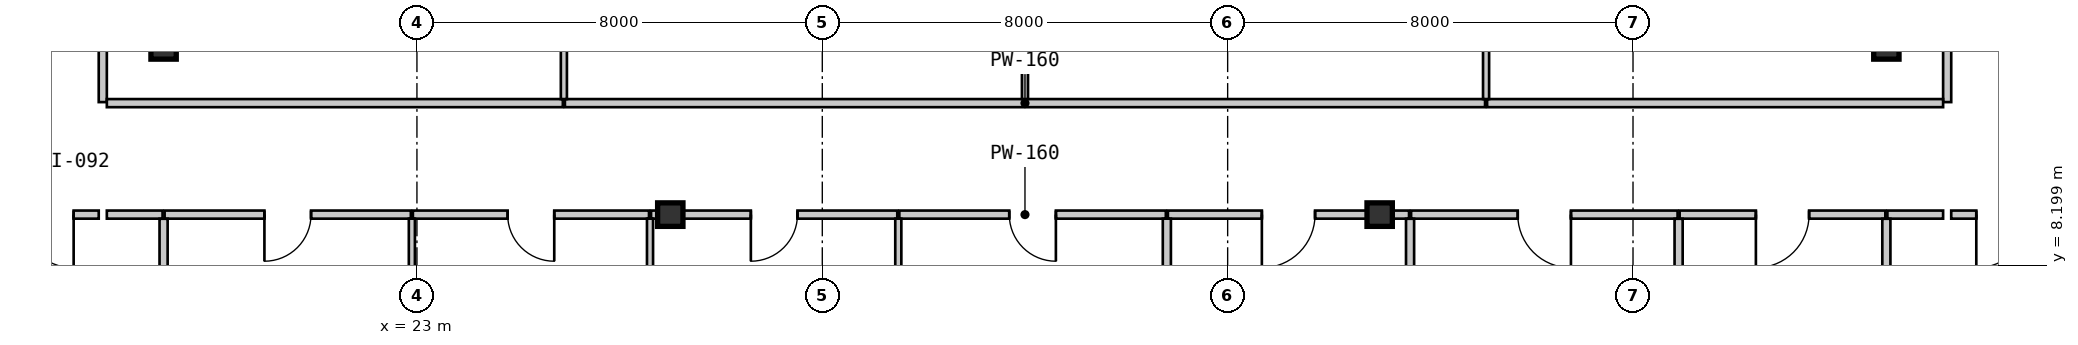
"""IFC4 building model, lengths in metres.
Left out: names, types, materials, properties, quantities, classifications, styles, units other than length and angle.
Written with IfcOpenShell. Run it as: python <this file> out.ifc"""

import sys

from ifc_helpers import new_model, si_unit, direction, frame, frame_2d, origin, origin_2d, place, context, subcontext, project, spatial, rectangle, i_section, extrude, source, transform, mapped, element, fill, save


model = new_model("IFC4")
c1 = context("Model", 3, precision=1e-05, world=origin(), true_north=direction((0.0, 1.0)))
c2 = subcontext(c1, "Body", "Model", "MODEL_VIEW")
j1 = project(units=[si_unit("LENGTHUNIT", "METRE"), si_unit("PLANEANGLEUNIT", "RADIAN")], contexts=[c1])
p1 = place(None, origin())
s1 = spatial("IfcSite", under=j1, at=p1, CompositionType="ELEMENT")
p2 = place(p1, origin())
s2 = spatial("IfcBuilding", under=s1, at=p2, CompositionType="ELEMENT")
p3 = place(p2, frame((0.0, 0.0, 68.25)))
s3 = spatial("IfcBuildingStorey", under=s2, at=p3, CompositionType="ELEMENT", Elevation=68.25)
m1 = source(origin(), c2, "Body", "SweptSolid", [
    extrude(i_section(OverallWidth=0.5, OverallDepth=0.464, WebThickness=0.022, FlangeThickness=0.034, at=origin_2d()), origin(), (0.0, 0.0, 1.0), 3.15),
])
for number, where, z_axis, x_axis in (
    (1, (28.0, 9.2, 0.0), (0.0, 0.0, 1.0), (1.0, 0.0, 0.0)),
    (2, (42.0, 9.2, 0.0), (0.0, 0.0, 1.0), (1.0, 0.0, 0.0)),
    (3, (18.0, 12.5, 0.0), (0.0, 0.0, 1.0), (1.0, 0.0, 0.0)),
    (4, (52.0, 12.5, 0.0), (0.0, 0.0, 1.0), (1.0, 0.0, 0.0)),
):
    element("IfcColumn", number, at=place(p3, frame(where, z_axis=z_axis, x_axis=x_axis)), inside=s3, PredefinedType="COLUMN", context=c2, shape_type="MappedRepresentation", body=[
        mapped(m1, transform((0.0, 0.0, 0.0), scale=1.0)),
    ])
m2 = source(origin(), c2, "Body", "SweptSolid", [
    extrude(rectangle(XDim=10.3, YDim=0.16, at=frame_2d((5.15, 0.0))), origin(), (0.0, 0.0, 1.0), 2.93),
])
p4 = place(p3, frame((16.8, 21.72, 0.0), z_axis=(0.0, 0.0, 1.0), x_axis=(0.0, -1.0, 0.0)))
e5 = element("IfcWall", 5, at=p4, inside=s3, PredefinedType="PARTITIONING", context=c2, shape_type="MappedRepresentation", body=[
    mapped(m2, transform((0.0, 0.0, 0.0), scale=1.0)),
])
m3 = source(origin(), c2, "Body", "SweptSolid", [
    extrude(rectangle(XDim=1.05, YDim=2.1, at=frame_2d((0.525, 1.05))), frame((0.0, 0.09, 0.0), z_axis=(0.0, -1.0, 0.0), x_axis=(1.0, 0.0, 0.0)), (0.0, 0.0, 1.0), 0.18),
])
p5 = place(p4, frame((4.595, 0.0, 0.0)))
e6 = element("IfcOpeningElement", 6, at=p5, cuts=e5, PredefinedType="OPENING", context=c2, shape_type="MappedRepresentation", body=[
    mapped(m3, transform((0.0, 0.0, 0.0), scale=1.0)),
])
p6 = place(p3, frame((53.2, 11.42, 0.0), z_axis=(0.0, 0.0, 1.0), x_axis=(0.0, 1.0, 0.0)))
e7 = element("IfcWall", 7, at=p6, inside=s3, PredefinedType="PARTITIONING", context=c2, shape_type="MappedRepresentation", body=[
    mapped(m2, transform((0.0, 0.0, 0.0), scale=1.0)),
])
p7 = place(p6, frame((4.655, 0.0, 0.0)))
e8 = element("IfcOpeningElement", 8, at=p7, cuts=e7, PredefinedType="OPENING", context=c2, shape_type="MappedRepresentation", body=[
    mapped(m3, transform((0.0, 0.0, 0.0), scale=1.0)),
])
m4 = source(origin(), c2, "Body", "SweptSolid", [
    extrude(rectangle(XDim=2.04, YDim=0.16, at=frame_2d((1.02, 0.0))), origin(), (0.0, 0.0, 1.0), 2.93),
])
p8 = place(p3, frame((16.72, 9.2, 0.0), z_axis=(0.0, 0.0, 1.0), x_axis=(-1.0, 0.0, 0.0)))
e9 = element("IfcWall", 9, at=p8, inside=s3, PredefinedType="PARTITIONING", context=c2, shape_type="MappedRepresentation", body=[
    mapped(m4, transform((0.0, 0.0, 0.0), scale=1.0)),
])
p9 = place(p8, frame((0.495, 0.0, 0.0)))
e10 = element("IfcOpeningElement", 10, at=p9, cuts=e9, PredefinedType="OPENING", context=c2, shape_type="MappedRepresentation", body=[
    mapped(m3, transform((0.0, 0.0, 0.0), scale=1.0)),
])
p10 = place(p3, frame((55.32, 9.2, 0.0), z_axis=(0.0, 0.0, 1.0), x_axis=(-1.0, 0.0, 0.0)))
e11 = element("IfcWall", 11, at=p10, inside=s3, PredefinedType="PARTITIONING", context=c2, shape_type="MappedRepresentation", body=[
    mapped(m4, transform((0.0, 0.0, 0.0), scale=1.0)),
])
p11 = place(p10, frame((0.495, 0.0, 0.0)))
e12 = element("IfcOpeningElement", 12, at=p11, cuts=e11, PredefinedType="OPENING", context=c2, shape_type="MappedRepresentation", body=[
    mapped(m3, transform((0.0, 0.0, 0.0), scale=1.0)),
])
m5 = source(origin(), c2, "Body", "SweptSolid", [
    extrude(rectangle(XDim=9.0, YDim=0.16, at=frame_2d((4.5, 0.0))), origin(), (0.0, 0.0, 1.0), 2.93),
])
p12 = place(p3, frame((16.88, 11.4, 0.0), z_axis=(0.0, 0.0, 1.0), x_axis=(1.0, 0.0, 0.0)))
e13 = element("IfcWall", 13, at=p12, inside=s3, PredefinedType="PARTITIONING", context=c2, shape_type="MappedRepresentation", body=[
    mapped(m5, transform((0.0, 0.0, 0.0), scale=1.0)),
])
m6 = source(origin(), c2, "Body", "SweptSolid", [
    extrude(rectangle(XDim=9.06, YDim=0.16, at=frame_2d((4.53, 0.0))), origin(), (0.0, 0.0, 1.0), 2.93),
])
for number, where, z_axis, x_axis in (
    (14, (25.92, 11.4, 0.0), (0.0, 0.0, 1.0), (1.0, 0.0, 0.0)),
    (15, (35.02, 11.4, 0.0), (0.0, 0.0, 1.0), (1.0, 0.0, 0.0)),
):
    element("IfcWall", number, at=place(p3, frame(where, z_axis=z_axis, x_axis=x_axis)), inside=s3, PredefinedType="PARTITIONING", context=c2, shape_type="MappedRepresentation", body=[
        mapped(m6, transform((0.0, 0.0, 0.0), scale=1.0)),
    ])
p13 = place(p3, frame((44.12, 11.4, 0.0), z_axis=(0.0, 0.0, 1.0), x_axis=(1.0, 0.0, 0.0)))
e16 = element("IfcWall", 16, at=p13, inside=s3, PredefinedType="PARTITIONING", context=c2, shape_type="MappedRepresentation", body=[
    mapped(m5, transform((0.0, 0.0, 0.0), scale=1.0)),
])
m7 = source(origin(), c2, "Body", "SweptSolid", [
    extrude(rectangle(XDim=1.1, YDim=0.16, at=frame_2d((0.55, 0.0))), origin(), (0.0, 0.0, 1.0), 2.93),
])
p14 = place(p3, frame((17.98, 9.2, 0.0), z_axis=(0.0, 0.0, 1.0), x_axis=(-1.0, 0.0, 0.0)))
e17 = element("IfcWall", 17, at=p14, inside=s3, PredefinedType="PARTITIONING", context=c2, shape_type="MappedRepresentation", body=[
    mapped(m7, transform((0.0, 0.0, 0.0), scale=1.0)),
])
m8 = source(origin(), c2, "Body", "SweptSolid", [
    extrude(rectangle(XDim=4.86, YDim=0.16, at=frame_2d((2.43, 0.0))), origin(), (0.0, 0.0, 1.0), 2.93),
])
p15 = place(p3, frame((22.88, 9.2, 0.0), z_axis=(0.0, 0.0, 1.0), x_axis=(-1.0, 0.0, 0.0)))
e18 = element("IfcWall", 18, at=p15, inside=s3, PredefinedType="PARTITIONING", context=c2, shape_type="MappedRepresentation", body=[
    mapped(m8, transform((0.0, 0.0, 0.0), scale=1.0)),
])
m9 = source(origin(), c2, "Body", "SweptSolid", [
    extrude(rectangle(XDim=0.92, YDim=2.1, at=frame_2d((0.46, 1.05))), frame((0.0, 0.09, 0.0), z_axis=(0.0, -1.0, 0.0), x_axis=(1.0, 0.0, 0.0)), (0.0, 0.0, 1.0), 0.18),
])
p16 = place(p15, frame((1.97, 0.0, 0.0)))
e19 = element("IfcOpeningElement", 19, at=p16, cuts=e18, PredefinedType="OPENING", context=c2, shape_type="MappedRepresentation", body=[
    mapped(m9, transform((0.0, 0.0, 0.0), scale=1.0)),
])
m10 = source(origin(), c2, "Body", "SweptSolid", [
    extrude(rectangle(XDim=4.66, YDim=0.16, at=frame_2d((2.33, 0.0))), origin(), (0.0, 0.0, 1.0), 2.93),
])
p17 = place(p3, frame((27.58, 9.2, 0.0), z_axis=(0.0, 0.0, 1.0), x_axis=(-1.0, 0.0, 0.0)))
e20 = element("IfcWall", 20, at=p17, inside=s3, PredefinedType="PARTITIONING", context=c2, shape_type="MappedRepresentation", body=[
    mapped(m10, transform((0.0, 0.0, 0.0), scale=1.0)),
])
p18 = place(p17, frame((1.87, 0.0, 0.0)))
e21 = element("IfcOpeningElement", 21, at=p18, cuts=e20, PredefinedType="OPENING", context=c2, shape_type="MappedRepresentation", body=[
    mapped(m9, transform((0.0, 0.0, 0.0), scale=1.0)),
])
m11 = source(origin(), c2, "Body", "SweptSolid", [
    extrude(rectangle(XDim=4.48, YDim=0.16, at=frame_2d((2.24, 0.0))), origin(), (0.0, 0.0, 1.0), 2.328),
])
p19 = place(p3, frame((32.48, 9.2, 0.0), z_axis=(0.0, 0.0, 1.0), x_axis=(-1.0, 0.0, 0.0)))
e22 = element("IfcWall", 22, at=p19, inside=s3, PredefinedType="PARTITIONING", context=c2, shape_type="MappedRepresentation", body=[
    mapped(m11, transform((0.0, 0.0, 0.0), scale=1.0)),
])
p20 = place(p19, frame((1.97, 0.0, 0.0)))
e23 = element("IfcOpeningElement", 23, at=p20, cuts=e22, PredefinedType="OPENING", context=c2, shape_type="MappedRepresentation", body=[
    mapped(m9, transform((0.0, 0.0, 0.0), scale=1.0)),
])
m12 = source(origin(), c2, "Body", "SweptSolid", [
    extrude(rectangle(XDim=0.38, YDim=0.16, at=frame_2d((0.19, 0.0))), origin(), (0.0, 0.0, 1.0), 2.93),
])
p21 = place(p3, frame((28.0, 9.2, 0.0), z_axis=(0.0, 0.0, 1.0), x_axis=(-1.0, 0.0, 0.0)))
e24 = element("IfcWall", 24, at=p21, inside=s3, PredefinedType="PARTITIONING", context=c2, shape_type="MappedRepresentation", body=[
    mapped(m12, transform((0.0, 0.0, 0.0), scale=1.0)),
])
m13 = source(origin(), c2, "Body", "SweptSolid", [
    extrude(rectangle(XDim=5.26, YDim=0.16, at=frame_2d((2.63, 0.0))), origin(), (0.0, 0.0, 1.0), 2.328),
])
p22 = place(p3, frame((37.78, 9.2, 0.0), z_axis=(0.0, 0.0, 1.0), x_axis=(-1.0, 0.0, 0.0)))
e25 = element("IfcWall", 25, at=p22, inside=s3, PredefinedType="PARTITIONING", context=c2, shape_type="MappedRepresentation", body=[
    mapped(m13, transform((0.0, 0.0, 0.0), scale=1.0)),
])
p23 = place(p22, frame((2.17, 0.0, 0.0)))
e26 = element("IfcOpeningElement", 26, at=p23, cuts=e25, PredefinedType="OPENING", context=c2, shape_type="MappedRepresentation", body=[
    mapped(m9, transform((0.0, 0.0, 0.0), scale=1.0)),
])
m14 = source(origin(), c2, "Body", "SweptSolid", [
    extrude(rectangle(XDim=0.58, YDim=0.16, at=frame_2d((0.29, 0.0))), origin(), (0.0, 0.0, 1.0), 2.93),
])
p24 = place(p3, frame((42.58, 9.2, 0.0), z_axis=(0.0, 0.0, 1.0), x_axis=(-1.0, 0.0, 0.0)))
e27 = element("IfcWall", 27, at=p24, inside=s3, PredefinedType="PARTITIONING", context=c2, shape_type="MappedRepresentation", body=[
    mapped(m14, transform((0.0, 0.0, 0.0), scale=1.0)),
])
m15 = source(origin(), c2, "Body", "SweptSolid", [
    extrude(rectangle(XDim=4.18, YDim=0.16, at=frame_2d((2.09, 0.0))), origin(), (0.0, 0.0, 1.0), 2.328),
])
p25 = place(p3, frame((42.0, 9.2, 0.0), z_axis=(0.0, 0.0, 1.0), x_axis=(-1.0, 0.0, 0.0)))
e28 = element("IfcWall", 28, at=p25, inside=s3, PredefinedType="PARTITIONING", context=c2, shape_type="MappedRepresentation", body=[
    mapped(m15, transform((0.0, 0.0, 0.0), scale=1.0)),
])
p26 = place(p25, frame((1.275, 0.0, 0.0)))
e29 = element("IfcOpeningElement", 29, at=p26, cuts=e28, PredefinedType="OPENING", context=c2, shape_type="MappedRepresentation", body=[
    mapped(m3, transform((0.0, 0.0, 0.0), scale=1.0)),
])
m16 = source(origin(), c2, "Body", "SweptSolid", [
    extrude(rectangle(XDim=5.259, YDim=0.16, at=frame_2d((2.63, 0.0))), origin(), (0.0, 0.0, 1.0), 2.93),
])
p27 = place(p3, frame((47.88, 9.2, 0.0), z_axis=(0.0, 0.0, 1.0), x_axis=(-1.0, 0.0, 0.0)))
e30 = element("IfcWall", 30, at=p27, inside=s3, PredefinedType="PARTITIONING", context=c2, shape_type="MappedRepresentation", body=[
    mapped(m16, transform((0.0, 0.0, 0.0), scale=1.0)),
])
p28 = place(p27, frame((2.105, 0.0, 0.0)))
e31 = element("IfcOpeningElement", 31, at=p28, cuts=e30, PredefinedType="OPENING", context=c2, shape_type="MappedRepresentation", body=[
    mapped(m3, transform((0.0, 0.0, 0.0), scale=1.0)),
])
m17 = source(origin(), c2, "Body", "SweptSolid", [
    extrude(rectangle(XDim=4.059, YDim=0.16, at=frame_2d((2.03, 0.0))), origin(), (0.0, 0.0, 1.0), 2.93),
])
p29 = place(p3, frame((51.98, 9.2, 0.0), z_axis=(0.0, 0.0, 1.0), x_axis=(-1.0, 0.0, 0.0)))
e32 = element("IfcWall", 32, at=p29, inside=s3, PredefinedType="PARTITIONING", context=c2, shape_type="MappedRepresentation", body=[
    mapped(m17, transform((0.0, 0.0, 0.0), scale=1.0)),
])
p30 = place(p29, frame((1.505, 0.0, 0.0)))
e33 = element("IfcOpeningElement", 33, at=p30, cuts=e32, PredefinedType="OPENING", context=c2, shape_type="MappedRepresentation", body=[
    mapped(m3, transform((0.0, 0.0, 0.0), scale=1.0)),
])
p31 = place(p3, frame((53.12, 9.2, 0.0), z_axis=(0.0, 0.0, 1.0), x_axis=(-1.0, 0.0, 0.0)))
e34 = element("IfcWall", 34, at=p31, inside=s3, PredefinedType="PARTITIONING", context=c2, shape_type="MappedRepresentation", body=[
    mapped(m7, transform((0.0, 0.0, 0.0), scale=1.0)),
])
m18 = source(origin(), c2, "Body", "SweptSolid", [
    extrude(rectangle(XDim=10.24, YDim=0.12, at=frame_2d((5.12, 0.0))), origin(), (0.0, 0.0, 1.0), 2.93),
])
for number, where, z_axis, x_axis in (
    (35, (25.9, 21.72, 0.0), (0.0, 0.0, 1.0), (0.0, -1.0, 0.0)),
    (36, (35.0, 21.72, 0.0), (0.0, 0.0, 1.0), (0.0, -1.0, 0.0)),
    (37, (44.1, 21.72, 0.0), (0.0, 0.0, 1.0), (0.0, -1.0, 0.0)),
):
    element("IfcWall", number, at=place(p3, frame(where, z_axis=z_axis, x_axis=x_axis)), inside=s3, PredefinedType="PARTITIONING", context=c2, shape_type="MappedRepresentation", body=[
        mapped(m18, transform((0.0, 0.0, 0.0), scale=1.0)),
    ])
m19 = source(origin(), c2, "Body", "SweptSolid", [
    extrude(rectangle(XDim=9.325, YDim=0.16, at=frame_2d((4.663, 0.0))), origin(), (0.0, 0.0, 1.0), 2.93),
])
p32 = place(p3, frame((18.0, 9.118, 0.0), z_axis=(0.0, 0.0, 1.0), x_axis=(0.0, -1.0, 0.0)))
e38 = element("IfcWall", 38, at=p32, inside=s3, PredefinedType="PARTITIONING", context=c2, shape_type="MappedRepresentation", body=[
    mapped(m19, transform((0.0, 0.0, 0.0), scale=1.0)),
])
m20 = source(origin(), c2, "Body", "SweptSolid", [
    extrude(rectangle(XDim=8.849, YDim=0.12, at=frame_2d((4.424, 0.0))), origin(), (0.0, 0.0, 1.0), 2.93),
])
p33 = place(p3, frame((22.9, 9.12, 0.0), z_axis=(0.0, 0.0, 1.0), x_axis=(0.0, -1.0, 0.0)))
e39 = element("IfcWall", 39, at=p33, inside=s3, PredefinedType="PARTITIONING", context=c2, shape_type="MappedRepresentation", body=[
    mapped(m20, transform((0.0, 0.0, 0.0), scale=1.0)),
])
m21 = source(origin(), c2, "Body", "SweptSolid", [
    extrude(rectangle(XDim=8.388, YDim=0.12, at=frame_2d((4.194, 0.0))), origin(), (0.0, 0.0, 1.0), 2.93),
])
p34 = place(p3, frame((27.6, 9.12, 0.0), z_axis=(0.0, 0.0, 1.0), x_axis=(0.0, -1.0, 0.0)))
e40 = element("IfcWall", 40, at=p34, inside=s3, PredefinedType="PARTITIONING", context=c2, shape_type="MappedRepresentation", body=[
    mapped(m21, transform((0.0, 0.0, 0.0), scale=1.0)),
])
m22 = source(origin(), c2, "Body", "SweptSolid", [
    extrude(rectangle(XDim=7.907, YDim=0.12, at=frame_2d((3.954, 0.0))), origin(), (0.0, 0.0, 1.0), 2.93),
])
p35 = place(p3, frame((32.5, 9.12, 0.0), z_axis=(0.0, 0.0, 1.0), x_axis=(0.0, -1.0, 0.0)))
e41 = element("IfcWall", 41, at=p35, inside=s3, PredefinedType="PARTITIONING", context=c2, shape_type="MappedRepresentation", body=[
    mapped(m22, transform((0.0, 0.0, 0.0), scale=1.0)),
])
m23 = source(origin(), c2, "Body", "SweptSolid", [
    extrude(rectangle(XDim=2.441, YDim=0.16, at=frame_2d((1.22, 0.0))), origin(), (0.0, 0.0, 1.0), 2.93),
])
p36 = place(p3, frame((37.8, 9.12, 0.0), z_axis=(0.0, 0.0, 1.0), x_axis=(0.0, -1.0, 0.0)))
e42 = element("IfcWall", 42, at=p36, inside=s3, PredefinedType="PARTITIONING", context=c2, shape_type="MappedRepresentation", body=[
    mapped(m23, transform((0.0, 0.0, 0.0), scale=1.0)),
])
m24 = source(origin(), c2, "Body", "SweptSolid", [
    extrude(rectangle(XDim=2.203, YDim=0.16, at=frame_2d((1.102, 0.0))), origin(), (0.0, 0.0, 1.0), 2.93),
])
p37 = place(p3, frame((42.6, 9.118, 0.0), z_axis=(0.0, 0.0, 1.0), x_axis=(0.0, -1.0, 0.0)))
e43 = element("IfcWall", 43, at=p37, inside=s3, PredefinedType="PARTITIONING", context=c2, shape_type="MappedRepresentation", body=[
    mapped(m24, transform((0.0, 0.0, 0.0), scale=1.0)),
])
m25 = source(origin(), c2, "Body", "SweptSolid", [
    extrude(rectangle(XDim=1.939, YDim=0.16, at=frame_2d((0.97, 0.0))), origin(), (0.0, 0.0, 1.0), 2.93),
])
p38 = place(p3, frame((47.9, 9.118, 0.0), z_axis=(0.0, 0.0, 1.0), x_axis=(0.0, -1.0, 0.0)))
e44 = element("IfcWall", 44, at=p38, inside=s3, PredefinedType="PARTITIONING", context=c2, shape_type="MappedRepresentation", body=[
    mapped(m25, transform((0.0, 0.0, 0.0), scale=1.0)),
])
m26 = source(origin(), c2, "Body", "SweptSolid", [
    extrude(rectangle(XDim=3.587, YDim=0.16, at=frame_2d((1.794, 0.0))), origin(), (0.0, 0.0, 1.0), 2.93),
])
p39 = place(p3, frame((52.0, 9.118, 0.0), z_axis=(0.0, 0.0, 1.0), x_axis=(0.0, -1.0, 0.0)))
e45 = element("IfcWall", 45, at=p39, inside=s3, PredefinedType="PARTITIONING", context=c2, shape_type="MappedRepresentation", body=[
    mapped(m26, transform((0.0, 0.0, 0.0), scale=1.0)),
])
m27 = source(origin(), c2, "Body", "SweptSolid", [
    extrude(rectangle(XDim=1.05, YDim=2.1, at=frame_2d((0.525, 1.05))), frame((0.0, 0.025, 0.0), z_axis=(0.0, -1.0, 0.0), x_axis=(1.0, 0.0, 0.0)), (0.0, 0.0, 1.0), 0.05),
])
p40 = place(p9, origin())
e46 = element("IfcDoor", 46, at=p40, inside=s3, OperationType="SINGLE_SWING_LEFT", PredefinedType="DOOR", context=c2, shape_type="MappedRepresentation", body=[
    mapped(m27, transform((0.0, 0.0, 0.0), scale=1.0)),
])
fill(e10, e46)
p41 = place(p11, origin())
e47 = element("IfcDoor", 47, at=p41, inside=s3, OperationType="SINGLE_SWING_RIGHT", PredefinedType="DOOR", context=c2, shape_type="MappedRepresentation", body=[
    mapped(m27, transform((0.0, 0.0, 0.0), scale=1.0)),
])
fill(e12, e47)
m28 = source(origin(), c2, "Body", "SweptSolid", [
    extrude(rectangle(XDim=0.92, YDim=2.1, at=frame_2d((0.46, 1.05))), frame((0.0, 0.025, 0.0), z_axis=(0.0, -1.0, 0.0), x_axis=(1.0, 0.0, 0.0)), (0.0, 0.0, 1.0), 0.05),
])
p42 = place(p16, origin())
e48 = element("IfcDoor", 48, at=p42, inside=s3, OperationType="SINGLE_SWING_RIGHT", PredefinedType="DOOR", context=c2, shape_type="MappedRepresentation", body=[
    mapped(m28, transform((0.0, 0.0, 0.0), scale=1.0)),
])
fill(e19, e48)
p43 = place(p18, origin())
e49 = element("IfcDoor", 49, at=p43, inside=s3, OperationType="SINGLE_SWING_LEFT", PredefinedType="DOOR", context=c2, shape_type="MappedRepresentation", body=[
    mapped(m28, transform((0.0, 0.0, 0.0), scale=1.0)),
])
fill(e21, e49)
p44 = place(p20, origin())
e50 = element("IfcDoor", 50, at=p44, inside=s3, OperationType="SINGLE_SWING_RIGHT", PredefinedType="DOOR", context=c2, shape_type="MappedRepresentation", body=[
    mapped(m28, transform((0.0, 0.0, 0.0), scale=1.0)),
])
fill(e23, e50)
p45 = place(p23, origin())
e51 = element("IfcDoor", 51, at=p45, inside=s3, OperationType="SINGLE_SWING_LEFT", PredefinedType="DOOR", context=c2, shape_type="MappedRepresentation", body=[
    mapped(m28, transform((0.0, 0.0, 0.0), scale=1.0)),
])
fill(e26, e51)
p46 = place(p26, origin())
e52 = element("IfcDoor", 52, at=p46, inside=s3, OperationType="SINGLE_SWING_RIGHT", PredefinedType="DOOR", context=c2, shape_type="MappedRepresentation", body=[
    mapped(m27, transform((0.0, 0.0, 0.0), scale=1.0)),
])
fill(e29, e52)
p47 = place(p28, origin())
e53 = element("IfcDoor", 53, at=p47, inside=s3, OperationType="SINGLE_SWING_LEFT", PredefinedType="DOOR", context=c2, shape_type="MappedRepresentation", body=[
    mapped(m27, transform((0.0, 0.0, 0.0), scale=1.0)),
])
fill(e31, e53)
p48 = place(p30, origin())
e54 = element("IfcDoor", 54, at=p48, inside=s3, OperationType="SINGLE_SWING_RIGHT", PredefinedType="DOOR", context=c2, shape_type="MappedRepresentation", body=[
    mapped(m27, transform((0.0, 0.0, 0.0), scale=1.0)),
])
fill(e33, e54)
save(model, sys.argv[1])
